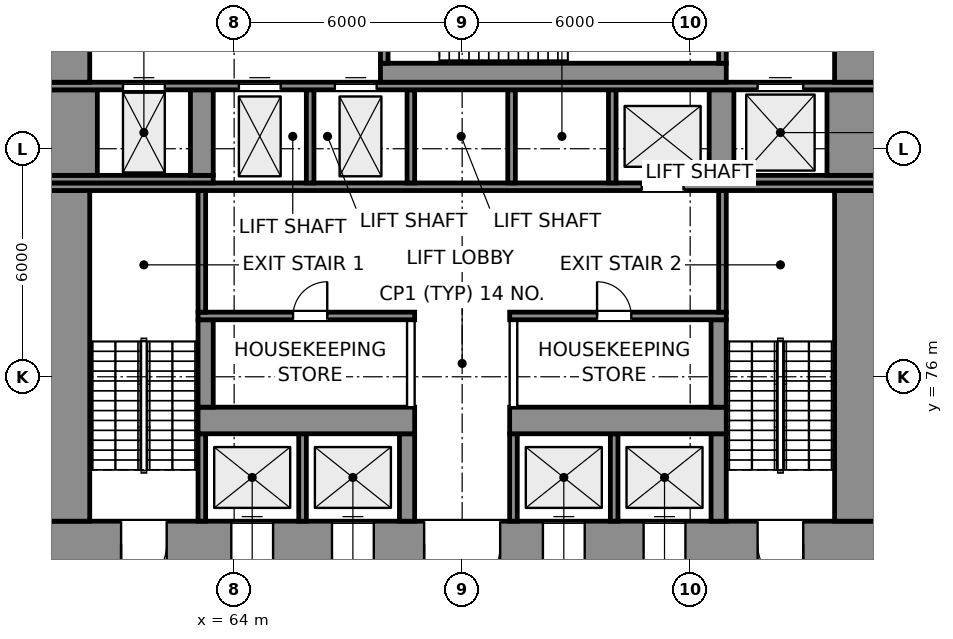
"""IFC4 building model, lengths in metres.
Left out: names, types, materials, properties, quantities, classifications, styles, units other than length and angle.
Written with IfcOpenShell. Run it as: python <this file> out.ifc"""

import sys

from ifc_helpers import new_model, si_unit, direction, frame, frame_2d, origin, place, context, subcontext, project, spatial, rectangle, extrude, element, fill, save


model = new_model("IFC4")
c1 = context("Model", 3, precision=1e-05, world=origin(), true_north=direction((0.0, 1.0)))
c2 = subcontext(c1, "Body", "Model", "MODEL_VIEW")
j1 = project(units=[si_unit("LENGTHUNIT", "METRE"), si_unit("PLANEANGLEUNIT", "RADIAN")], contexts=[c1])
p1 = place(None, origin())
s1 = spatial("IfcSite", under=j1, at=p1, CompositionType="ELEMENT")
p2 = place(p1, origin())
s2 = spatial("IfcBuilding", under=s1, at=p2, CompositionType="ELEMENT")
p3 = place(p2, frame((0.0, 0.0, 29.0)))
s3 = spatial("IfcBuildingStorey", under=s2, at=p3, CompositionType="ELEMENT", Elevation=29.0)
p4 = place(p3, frame((59.0, 71.6, 0.0), z_axis=(0.0, 0.0, 1.0), x_axis=(1.0, 0.0, 0.0)))
e1 = element("IfcWall", 1, at=p4, inside=s3, PredefinedType="SHEAR", context=c2, shape_type="SweptSolid", body=[
    extrude(rectangle(XDim=22.0, YDim=1.2, at=frame_2d((11.0, 0.0))), origin(), (0.0, 0.0, 1.0), 5.0),
])
p5 = place(p4, frame((2.025, 0.0, 0.0)))
e2 = element("IfcOpeningElement", 2, at=p5, cuts=e1, PredefinedType="OPENING", context=c2, shape_type="SweptSolid", body=[
    extrude(rectangle(XDim=1.2, YDim=2.1, at=frame_2d((0.6, 1.05))), frame((0.0, 0.61, 0.0), z_axis=(0.0, -1.0, 0.0), x_axis=(1.0, 0.0, 0.0)), (0.0, 0.0, 1.0), 1.22),
])
p6 = place(p4, frame((18.775, 0.0, 0.0)))
e3 = element("IfcOpeningElement", 3, at=p6, cuts=e1, PredefinedType="OPENING", context=c2, shape_type="SweptSolid", body=[
    extrude(rectangle(XDim=1.2, YDim=2.1, at=frame_2d((0.6, 1.05))), frame((0.0, 0.61, 0.0), z_axis=(0.0, -1.0, 0.0), x_axis=(1.0, 0.0, 0.0)), (0.0, 0.0, 1.0), 1.22),
])
p7 = place(p4, frame((10.0, 0.0, 0.0)))
e4 = element("IfcOpeningElement", 4, at=p7, cuts=e1, PredefinedType="OPENING", context=c2, shape_type="SweptSolid", body=[
    extrude(rectangle(XDim=2.0, YDim=2.1, at=frame_2d((1.0, 1.05))), frame((0.0, 0.61, 0.0), z_axis=(0.0, -1.0, 0.0), x_axis=(1.0, 0.0, 0.0)), (0.0, 0.0, 1.0), 1.22),
])
p8 = place(p4, frame((4.925, 0.0, 0.0)))
e5 = element("IfcOpeningElement", 5, at=p8, cuts=e1, PredefinedType="OPENING", context=c2, shape_type="SweptSolid", body=[
    extrude(rectangle(XDim=1.1, YDim=2.1, at=frame_2d((0.55, 1.05))), frame((0.0, 0.61, 0.0), z_axis=(0.0, -1.0, 0.0), x_axis=(1.0, 0.0, 0.0)), (0.0, 0.0, 1.0), 1.22),
])
p9 = place(p4, frame((7.575, 0.0, 0.0)))
e6 = element("IfcOpeningElement", 6, at=p9, cuts=e1, PredefinedType="OPENING", context=c2, shape_type="SweptSolid", body=[
    extrude(rectangle(XDim=1.1, YDim=2.1, at=frame_2d((0.55, 1.05))), frame((0.0, 0.61, 0.0), z_axis=(0.0, -1.0, 0.0), x_axis=(1.0, 0.0, 0.0)), (0.0, 0.0, 1.0), 1.22),
])
p10 = place(p4, frame((13.125, 0.0, 0.0)))
e7 = element("IfcOpeningElement", 7, at=p10, cuts=e1, PredefinedType="OPENING", context=c2, shape_type="SweptSolid", body=[
    extrude(rectangle(XDim=1.1, YDim=2.1, at=frame_2d((0.55, 1.05))), frame((0.0, 0.61, 0.0), z_axis=(0.0, -1.0, 0.0), x_axis=(1.0, 0.0, 0.0)), (0.0, 0.0, 1.0), 1.22),
])
p11 = place(p4, frame((15.775, 0.0, 0.0)))
e8 = element("IfcOpeningElement", 8, at=p11, cuts=e1, PredefinedType="OPENING", context=c2, shape_type="SweptSolid", body=[
    extrude(rectangle(XDim=1.1, YDim=2.1, at=frame_2d((0.55, 1.05))), frame((0.0, 0.61, 0.0), z_axis=(0.0, -1.0, 0.0), x_axis=(1.0, 0.0, 0.0)), (0.0, 0.0, 1.0), 1.22),
])
p12 = place(p3, frame((59.6, 72.2, 0.0), z_axis=(0.0, 0.0, 1.0), x_axis=(0.0, 1.0, 0.0)))
e9 = element("IfcWall", 9, at=p12, inside=s3, PredefinedType="SHEAR", context=c2, shape_type="SweptSolid", body=[
    extrude(rectangle(XDim=8.7, YDim=1.2, at=frame_2d((4.35, 0.0))), origin(), (0.0, 0.0, 1.0), 5.0),
])
for number, where, z_axis, x_axis in (
    (10, (63.15, 72.2, 0.0), (0.0, 0.0, 1.0), (0.0, 1.0, 0.0)),
    (11, (65.8, 72.2, 0.0), (0.0, 0.0, 1.0), (0.0, 1.0, 0.0)),
):
    element("IfcWall", number, at=place(p3, frame(where, z_axis=z_axis, x_axis=x_axis)), inside=s3, PredefinedType="SHEAR", context=c2, shape_type="SweptSolid", body=[
        extrude(rectangle(XDim=2.3, YDim=0.2, at=frame_2d((1.15, 0.0))), origin(), (0.0, 0.0, 1.0), 5.0),
    ])
p13 = place(p3, frame((68.55, 72.2, 0.0), z_axis=(0.0, 0.0, 1.0), x_axis=(0.0, 1.0, 0.0)))
e12 = element("IfcWall", 12, at=p13, inside=s3, PredefinedType="SHEAR", context=c2, shape_type="SweptSolid", body=[
    extrude(rectangle(XDim=2.3, YDim=0.4, at=frame_2d((1.15, 0.0))), origin(), (0.0, 0.0, 1.0), 5.0),
])
for number, where, z_axis, x_axis in (
    (13, (71.35, 72.2, 0.0), (0.0, 0.0, 1.0), (0.0, 1.0, 0.0)),
    (14, (74.0, 72.2, 0.0), (0.0, 0.0, 1.0), (0.0, 1.0, 0.0)),
):
    element("IfcWall", number, at=place(p3, frame(where, z_axis=z_axis, x_axis=x_axis)), inside=s3, PredefinedType="SHEAR", context=c2, shape_type="SweptSolid", body=[
        extrude(rectangle(XDim=2.3, YDim=0.2, at=frame_2d((1.15, 0.0))), origin(), (0.0, 0.0, 1.0), 5.0),
    ])
p14 = place(p3, frame((76.75, 72.2, 0.0), z_axis=(0.0, 0.0, 1.0), x_axis=(0.0, 1.0, 0.0)))
e15 = element("IfcWall", 15, at=p14, inside=s3, PredefinedType="SHEAR", context=c2, shape_type="SweptSolid", body=[
    extrude(rectangle(XDim=2.3, YDim=0.4, at=frame_2d((1.15, 0.0))), origin(), (0.0, 0.0, 1.0), 5.0),
])
p15 = place(p3, frame((80.4, 72.2, 0.0), z_axis=(0.0, 0.0, 1.0), x_axis=(0.0, 1.0, 0.0)))
e16 = element("IfcWall", 16, at=p15, inside=s3, PredefinedType="SHEAR", context=c2, shape_type="SweptSolid", body=[
    extrude(rectangle(XDim=8.7, YDim=1.2, at=frame_2d((4.35, 0.0))), origin(), (0.0, 0.0, 1.0), 5.0),
])
for number, where, z_axis, x_axis in (
    (17, (63.05, 74.85, 0.0), (0.0, 0.0, 1.0), (1.0, 0.0, 0.0)),
    (18, (71.25, 74.85, 0.0), (0.0, 0.0, 1.0), (1.0, 0.0, 0.0)),
):
    element("IfcWall", number, at=place(p3, frame(where, z_axis=z_axis, x_axis=x_axis)), inside=s3, PredefinedType="SHEAR", context=c2, shape_type="SweptSolid", body=[
        extrude(rectangle(XDim=5.7, YDim=0.7, at=frame_2d((2.85, 0.0))), origin(), (0.0, 0.0, 1.0), 5.0),
    ])
p16 = place(p3, frame((63.25, 75.2, 0.0), z_axis=(0.0, 0.0, 1.0), x_axis=(0.0, 1.0, 0.0)))
e19 = element("IfcWall", 19, at=p16, inside=s3, PredefinedType="SHEAR", context=c2, shape_type="SweptSolid", body=[
    extrude(rectangle(XDim=2.3, YDim=0.4, at=frame_2d((1.15, 0.0))), origin(), (0.0, 0.0, 1.0), 5.0),
])
for number, where, z_axis, x_axis in (
    (20, (68.65, 75.2, 0.0), (0.0, 0.0, 1.0), (0.0, 1.0, 0.0)),
    (21, (71.35, 75.2, 0.0), (0.0, 0.0, 1.0), (0.0, 1.0, 0.0)),
):
    element("IfcWall", number, at=place(p3, frame(where, z_axis=z_axis, x_axis=x_axis)), inside=s3, PredefinedType="PARTITIONING", context=c2, shape_type="SweptSolid", body=[
        extrude(rectangle(XDim=2.3, YDim=0.2, at=frame_2d((1.15, 0.0))), origin(), (0.0, 0.0, 1.0), 4.65),
    ])
p17 = place(p3, frame((76.75, 75.2, 0.0), z_axis=(0.0, 0.0, 1.0), x_axis=(0.0, 1.0, 0.0)))
e22 = element("IfcWall", 22, at=p17, inside=s3, PredefinedType="SHEAR", context=c2, shape_type="SweptSolid", body=[
    extrude(rectangle(XDim=2.3, YDim=0.4, at=frame_2d((1.15, 0.0))), origin(), (0.0, 0.0, 1.0), 5.0),
])
p18 = place(p3, frame((63.05, 77.6, 0.0), z_axis=(0.0, 0.0, 1.0), x_axis=(1.0, 0.0, 0.0)))
e23 = element("IfcWall", 23, at=p18, inside=s3, PredefinedType="SHEAR", context=c2, shape_type="SweptSolid", body=[
    extrude(rectangle(XDim=5.7, YDim=0.2, at=frame_2d((2.85, 0.0))), origin(), (0.0, 0.0, 1.0), 5.0),
])
p19 = place(p18, frame((2.5, 0.0, 0.0)))
e24 = element("IfcOpeningElement", 24, at=p19, cuts=e23, PredefinedType="OPENING", context=c2, shape_type="SweptSolid", body=[
    extrude(rectangle(XDim=0.9, YDim=2.1, at=frame_2d((0.45, 1.05))), frame((0.0, 0.11, 0.0), z_axis=(0.0, -1.0, 0.0), x_axis=(1.0, 0.0, 0.0)), (0.0, 0.0, 1.0), 0.22),
])
p20 = place(p3, frame((71.25, 77.6, 0.0), z_axis=(0.0, 0.0, 1.0), x_axis=(1.0, 0.0, 0.0)))
e25 = element("IfcWall", 25, at=p20, inside=s3, PredefinedType="SHEAR", context=c2, shape_type="SweptSolid", body=[
    extrude(rectangle(XDim=5.7, YDim=0.2, at=frame_2d((2.85, 0.0))), origin(), (0.0, 0.0, 1.0), 5.0),
])
p21 = place(p20, frame((2.3, 0.0, 0.0)))
e26 = element("IfcOpeningElement", 26, at=p21, cuts=e25, PredefinedType="OPENING", context=c2, shape_type="SweptSolid", body=[
    extrude(rectangle(XDim=0.9, YDim=2.1, at=frame_2d((0.45, 1.05))), frame((0.0, 0.11, 0.0), z_axis=(0.0, -1.0, 0.0), x_axis=(1.0, 0.0, 0.0)), (0.0, 0.0, 1.0), 0.22),
])
for number, where, z_axis, x_axis in (
    (27, (63.15, 77.7, 0.0), (0.0, 0.0, 1.0), (0.0, 1.0, 0.0)),
    (28, (76.85, 77.7, 0.0), (0.0, 0.0, 1.0), (0.0, 1.0, 0.0)),
):
    element("IfcWall", number, at=place(p3, frame(where, z_axis=z_axis, x_axis=x_axis)), inside=s3, PredefinedType="SHEAR", context=c2, shape_type="SweptSolid", body=[
        extrude(rectangle(XDim=3.2, YDim=0.2, at=frame_2d((1.6, 0.0))), origin(), (0.0, 0.0, 1.0), 5.0),
    ])
p22 = place(p3, frame((59.0, 81.0, 0.0), z_axis=(0.0, 0.0, 1.0), x_axis=(1.0, 0.0, 0.0)))
e29 = element("IfcWall", 29, at=p22, inside=s3, PredefinedType="SHEAR", context=c2, shape_type="SweptSolid", body=[
    extrude(rectangle(XDim=22.0, YDim=0.2, at=frame_2d((11.0, 0.0))), origin(), (0.0, 0.0, 1.0), 5.0),
])
p23 = place(p22, frame((15.725, 0.0, 0.0)))
e30 = element("IfcOpeningElement", 30, at=p23, cuts=e29, PredefinedType="OPENING", context=c2, shape_type="SweptSolid", body=[
    extrude(rectangle(XDim=1.1, YDim=2.1, at=frame_2d((0.55, 1.05))), frame((0.0, 0.11, 0.0), z_axis=(0.0, -1.0, 0.0), x_axis=(1.0, 0.0, 0.0)), (0.0, 0.0, 1.0), 0.22),
])
p24 = place(p3, frame((59.0, 81.2, 0.0), z_axis=(0.0, 0.0, 1.0), x_axis=(1.0, 0.0, 0.0)))
e31 = element("IfcWall", 31, at=p24, inside=s3, PredefinedType="SHEAR", context=c2, shape_type="SweptSolid", body=[
    extrude(rectangle(XDim=4.45, YDim=0.2, at=frame_2d((2.225, 0.0))), origin(), (0.0, 0.0, 1.0), 5.0),
])
for number, where, z_axis, x_axis in (
    (32, (66.0, 81.1, 0.0), (0.0, 0.0, 1.0), (0.0, 1.0, 0.0)),
    (33, (68.65, 81.1, 0.0), (0.0, 0.0, 1.0), (0.0, 1.0, 0.0)),
    (34, (71.3, 81.1, 0.0), (0.0, 0.0, 1.0), (0.0, 1.0, 0.0)),
    (35, (73.95, 81.1, 0.0), (0.0, 0.0, 1.0), (0.0, 1.0, 0.0)),
):
    element("IfcWall", number, at=place(p3, frame(where, z_axis=z_axis, x_axis=x_axis)), inside=s3, PredefinedType="SHEAR", context=c2, shape_type="SweptSolid", body=[
        extrude(rectangle(XDim=2.45, YDim=0.2, at=frame_2d((1.225, 0.0))), origin(), (0.0, 0.0, 1.0), 5.0),
    ])
p25 = place(p3, frame((76.5, 81.2, 0.0), z_axis=(0.0, 0.0, 1.0), x_axis=(1.0, 0.0, 0.0)))
e36 = element("IfcWall", 36, at=p25, inside=s3, PredefinedType="SHEAR", context=c2, shape_type="SweptSolid", body=[
    extrude(rectangle(XDim=4.5, YDim=0.2, at=frame_2d((2.25, 0.0))), origin(), (0.0, 0.0, 1.0), 5.0),
])
p26 = place(p3, frame((59.7, 81.3, 0.0), z_axis=(0.0, 0.0, 1.0), x_axis=(0.0, 1.0, 0.0)))
e37 = element("IfcWall", 37, at=p26, inside=s3, PredefinedType="SHEAR", context=c2, shape_type="SweptSolid", body=[
    extrude(rectangle(XDim=2.25, YDim=1.4, at=frame_2d((1.125, 0.0))), origin(), (0.0, 0.0, 1.0), 5.0),
])
p27 = place(p3, frame((63.15, 81.3, 0.0), z_axis=(0.0, 0.0, 1.0), x_axis=(0.0, 1.0, 0.0)))
e38 = element("IfcWall", 38, at=p27, inside=s3, PredefinedType="SHEAR", context=c2, shape_type="SweptSolid", body=[
    extrude(rectangle(XDim=2.25, YDim=0.6, at=frame_2d((1.125, 0.0))), origin(), (0.0, 0.0, 1.0), 5.0),
])
p28 = place(p3, frame((76.825, 81.3, 0.0), z_axis=(0.0, 0.0, 1.0), x_axis=(0.0, 1.0, 0.0)))
e39 = element("IfcWall", 39, at=p28, inside=s3, PredefinedType="SHEAR", context=c2, shape_type="SweptSolid", body=[
    extrude(rectangle(XDim=2.25, YDim=0.65, at=frame_2d((1.125, 0.0))), origin(), (0.0, 0.0, 1.0), 5.0),
])
p29 = place(p3, frame((80.3, 81.3, 0.0), z_axis=(0.0, 0.0, 1.0), x_axis=(0.0, 1.0, 0.0)))
e40 = element("IfcWall", 40, at=p29, inside=s3, PredefinedType="SHEAR", context=c2, shape_type="SweptSolid", body=[
    extrude(rectangle(XDim=2.25, YDim=1.4, at=frame_2d((1.125, 0.0))), origin(), (0.0, 0.0, 1.0), 5.0),
])
p30 = place(p3, frame((59.0, 83.65, 0.0), z_axis=(0.0, 0.0, 1.0), x_axis=(1.0, 0.0, 0.0)))
e41 = element("IfcWall", 41, at=p30, inside=s3, PredefinedType="SHEAR", context=c2, shape_type="SweptSolid", body=[
    extrude(rectangle(XDim=22.0, YDim=0.2, at=frame_2d((11.0, 0.0))), origin(), (0.0, 0.0, 1.0), 5.0),
])
p31 = place(p30, frame((5.125, 0.0, 0.0)))
e42 = element("IfcOpeningElement", 42, at=p31, cuts=e41, PredefinedType="OPENING", context=c2, shape_type="SweptSolid", body=[
    extrude(rectangle(XDim=1.1, YDim=2.1, at=frame_2d((0.55, 1.05))), frame((0.0, 0.11, 0.0), z_axis=(0.0, -1.0, 0.0), x_axis=(1.0, 0.0, 0.0)), (0.0, 0.0, 1.0), 0.22),
])
p32 = place(p30, frame((7.65, 0.0, 0.0)))
e43 = element("IfcOpeningElement", 43, at=p32, cuts=e41, PredefinedType="OPENING", context=c2, shape_type="SweptSolid", body=[
    extrude(rectangle(XDim=1.1, YDim=2.1, at=frame_2d((0.55, 1.05))), frame((0.0, 0.11, 0.0), z_axis=(0.0, -1.0, 0.0), x_axis=(1.0, 0.0, 0.0)), (0.0, 0.0, 1.0), 0.22),
])
p33 = place(p30, frame((18.775, 0.0, 0.0)))
e44 = element("IfcOpeningElement", 44, at=p33, cuts=e41, PredefinedType="OPENING", context=c2, shape_type="SweptSolid", body=[
    extrude(rectangle(XDim=1.2, YDim=2.1, at=frame_2d((0.6, 1.05))), frame((0.0, 0.11, 0.0), z_axis=(0.0, -1.0, 0.0), x_axis=(1.0, 0.0, 0.0)), (0.0, 0.0, 1.0), 0.22),
])
p34 = place(p30, frame((2.075, 0.0, 0.0)))
e45 = element("IfcOpeningElement", 45, at=p34, cuts=e41, PredefinedType="OPENING", context=c2, shape_type="SweptSolid", body=[
    extrude(rectangle(XDim=1.1, YDim=2.1, at=frame_2d((0.55, 1.05))), frame((0.0, 0.11, 0.0), z_axis=(0.0, -1.0, 0.0), x_axis=(1.0, 0.0, 0.0)), (0.0, 0.0, 1.0), 0.22),
])
p35 = place(p3, frame((59.6, 83.75, 0.0), z_axis=(0.0, 0.0, 1.0), x_axis=(0.0, 1.0, 0.0)))
e46 = element("IfcWall", 46, at=p35, inside=s3, PredefinedType="SHEAR", context=c2, shape_type="SweptSolid", body=[
    extrude(rectangle(XDim=3.05, YDim=1.2, at=frame_2d((1.525, 0.0))), origin(), (0.0, 0.0, 1.0), 5.0),
])
p36 = place(p35, frame((0.975, 0.0, 0.0)))
e47 = element("IfcOpeningElement", 47, at=p36, cuts=e46, PredefinedType="OPENING", context=c2, shape_type="SweptSolid", body=[
    extrude(rectangle(XDim=1.1, YDim=2.1, at=frame_2d((0.55, 1.05))), frame((0.0, 0.61, 0.0), z_axis=(0.0, -1.0, 0.0), x_axis=(1.0, 0.0, 0.0)), (0.0, 0.0, 1.0), 1.22),
])
p37 = place(p3, frame((67.85, 84.0, 0.0), z_axis=(0.0, 0.0, 1.0), x_axis=(1.0, 0.0, 0.0)))
e48 = element("IfcWall", 48, at=p37, inside=s3, PredefinedType="SHEAR", context=c2, shape_type="SweptSolid", body=[
    extrude(rectangle(XDim=9.1, YDim=0.5, at=frame_2d((4.55, 0.0))), origin(), (0.0, 0.0, 1.0), 5.0),
])
p38 = place(p3, frame((80.4, 83.75, 0.0), z_axis=(0.0, 0.0, 1.0), x_axis=(0.0, 1.0, 0.0)))
e49 = element("IfcWall", 49, at=p38, inside=s3, PredefinedType="SHEAR", context=c2, shape_type="SweptSolid", body=[
    extrude(rectangle(XDim=3.05, YDim=1.2, at=frame_2d((1.525, 0.0))), origin(), (0.0, 0.0, 1.0), 5.0),
])
p39 = place(p38, frame((0.925, 0.0, 0.0)))
e50 = element("IfcOpeningElement", 50, at=p39, cuts=e49, PredefinedType="OPENING", context=c2, shape_type="SweptSolid", body=[
    extrude(rectangle(XDim=1.2, YDim=2.1, at=frame_2d((0.6, 1.05))), frame((0.0, 0.61, 0.0), z_axis=(0.0, -1.0, 0.0), x_axis=(1.0, 0.0, 0.0)), (0.0, 0.0, 1.0), 1.22),
])
p40 = place(p3, frame((67.95, 84.25, 0.0), z_axis=(0.0, 0.0, 1.0), x_axis=(0.0, 1.0, 0.0)))
e51 = element("IfcWall", 51, at=p40, inside=s3, PredefinedType="SHEAR", context=c2, shape_type="SweptSolid", body=[
    extrude(rectangle(XDim=2.55, YDim=0.2, at=frame_2d((1.275, 0.0))), origin(), (0.0, 0.0, 1.0), 5.0),
])
p41 = place(p40, frame((0.825, 0.0, 0.0)))
e52 = element("IfcOpeningElement", 52, at=p41, cuts=e51, PredefinedType="OPENING", context=c2, shape_type="SweptSolid", body=[
    extrude(rectangle(XDim=1.2, YDim=2.1, at=frame_2d((0.6, 1.05))), frame((0.0, 0.11, 0.0), z_axis=(0.0, -1.0, 0.0), x_axis=(1.0, 0.0, 0.0)), (0.0, 0.0, 1.0), 0.22),
])
p42 = place(p3, frame((76.85, 84.25, 0.0), z_axis=(0.0, 0.0, 1.0), x_axis=(0.0, 1.0, 0.0)))
e53 = element("IfcWall", 53, at=p42, inside=s3, PredefinedType="SHEAR", context=c2, shape_type="SweptSolid", body=[
    extrude(rectangle(XDim=2.55, YDim=0.2, at=frame_2d((1.275, 0.0))), origin(), (0.0, 0.0, 1.0), 5.0),
])
p43 = place(p5, frame((1.2, 0.0, 0.0), z_axis=(0.0, 0.0, 1.0), x_axis=(-1.0, 0.0, 0.0)))
e54 = element("IfcDoor", 54, at=p43, inside=s3, OperationType="SINGLE_SWING_RIGHT", PredefinedType="DOOR", context=c2, shape_type="SweptSolid", body=[
    extrude(rectangle(XDim=1.2, YDim=2.1, at=frame_2d((0.6, 1.05))), frame((0.0, 0.025, 0.0), z_axis=(0.0, -1.0, 0.0), x_axis=(1.0, 0.0, 0.0)), (0.0, 0.0, 1.0), 0.05),
])
fill(e2, e54)
p44 = place(p6, frame((1.2, 0.0, 0.0), z_axis=(0.0, 0.0, 1.0), x_axis=(-1.0, 0.0, 0.0)))
e55 = element("IfcDoor", 55, at=p44, inside=s3, OperationType="SINGLE_SWING_LEFT", PredefinedType="DOOR", context=c2, shape_type="SweptSolid", body=[
    extrude(rectangle(XDim=1.2, YDim=2.1, at=frame_2d((0.6, 1.05))), frame((0.0, 0.025, 0.0), z_axis=(0.0, -1.0, 0.0), x_axis=(1.0, 0.0, 0.0)), (0.0, 0.0, 1.0), 0.05),
])
fill(e3, e55)
p45 = place(p7, frame((2.0, 0.0, 0.0), z_axis=(0.0, 0.0, 1.0), x_axis=(-1.0, 0.0, 0.0)))
e56 = element("IfcDoor", 56, at=p45, inside=s3, OperationType="DOUBLE_DOOR_SINGLE_SWING", PredefinedType="DOOR", context=c2, shape_type="SweptSolid", body=[
    extrude(rectangle(XDim=2.0, YDim=2.1, at=frame_2d((1.0, 1.05))), frame((0.0, 0.025, 0.0), z_axis=(0.0, -1.0, 0.0), x_axis=(1.0, 0.0, 0.0)), (0.0, 0.0, 1.0), 0.05),
])
fill(e4, e56)
p46 = place(p31, origin())
e57 = element("IfcDoor", 57, at=p46, inside=s3, OperationType="DOUBLE_DOOR_SLIDING", PredefinedType="DOOR", context=c2, shape_type="SweptSolid", body=[
    extrude(rectangle(XDim=1.1, YDim=2.1, at=frame_2d((0.55, 1.05))), frame((0.0, 0.025, 0.0), z_axis=(0.0, -1.0, 0.0), x_axis=(1.0, 0.0, 0.0)), (0.0, 0.0, 1.0), 0.05),
])
fill(e42, e57)
p47 = place(p32, origin())
e58 = element("IfcDoor", 58, at=p47, inside=s3, OperationType="DOUBLE_DOOR_SLIDING", PredefinedType="DOOR", context=c2, shape_type="SweptSolid", body=[
    extrude(rectangle(XDim=1.1, YDim=2.1, at=frame_2d((0.55, 1.05))), frame((0.0, 0.025, 0.0), z_axis=(0.0, -1.0, 0.0), x_axis=(1.0, 0.0, 0.0)), (0.0, 0.0, 1.0), 0.05),
])
fill(e43, e58)
p48 = place(p23, origin())
e59 = element("IfcDoor", 59, at=p48, inside=s3, OperationType="DOUBLE_DOOR_SLIDING", PredefinedType="DOOR", context=c2, shape_type="SweptSolid", body=[
    extrude(rectangle(XDim=1.1, YDim=2.1, at=frame_2d((0.55, 1.05))), frame((0.0, 0.025, 0.0), z_axis=(0.0, -1.0, 0.0), x_axis=(1.0, 0.0, 0.0)), (0.0, 0.0, 1.0), 0.05),
])
fill(e30, e59)
p49 = place(p8, origin())
e60 = element("IfcDoor", 60, at=p49, inside=s3, OperationType="DOUBLE_DOOR_SLIDING", PredefinedType="DOOR", context=c2, shape_type="SweptSolid", body=[
    extrude(rectangle(XDim=1.1, YDim=2.1, at=frame_2d((0.55, 1.05))), frame((0.0, 0.025, 0.0), z_axis=(0.0, -1.0, 0.0), x_axis=(1.0, 0.0, 0.0)), (0.0, 0.0, 1.0), 0.05),
])
fill(e5, e60)
p50 = place(p9, origin())
e61 = element("IfcDoor", 61, at=p50, inside=s3, OperationType="DOUBLE_DOOR_SLIDING", PredefinedType="DOOR", context=c2, shape_type="SweptSolid", body=[
    extrude(rectangle(XDim=1.1, YDim=2.1, at=frame_2d((0.55, 1.05))), frame((0.0, 0.025, 0.0), z_axis=(0.0, -1.0, 0.0), x_axis=(1.0, 0.0, 0.0)), (0.0, 0.0, 1.0), 0.05),
])
fill(e6, e61)
p51 = place(p10, origin())
e62 = element("IfcDoor", 62, at=p51, inside=s3, OperationType="DOUBLE_DOOR_SLIDING", PredefinedType="DOOR", context=c2, shape_type="SweptSolid", body=[
    extrude(rectangle(XDim=1.1, YDim=2.1, at=frame_2d((0.55, 1.05))), frame((0.0, 0.025, 0.0), z_axis=(0.0, -1.0, 0.0), x_axis=(1.0, 0.0, 0.0)), (0.0, 0.0, 1.0), 0.05),
])
fill(e7, e62)
p52 = place(p11, origin())
e63 = element("IfcDoor", 63, at=p52, inside=s3, OperationType="DOUBLE_DOOR_SLIDING", PredefinedType="DOOR", context=c2, shape_type="SweptSolid", body=[
    extrude(rectangle(XDim=1.1, YDim=2.1, at=frame_2d((0.55, 1.05))), frame((0.0, 0.025, 0.0), z_axis=(0.0, -1.0, 0.0), x_axis=(1.0, 0.0, 0.0)), (0.0, 0.0, 1.0), 0.05),
])
fill(e8, e63)
p53 = place(p33, origin())
e64 = element("IfcDoor", 64, at=p53, inside=s3, OperationType="DOUBLE_DOOR_SLIDING", PredefinedType="DOOR", context=c2, shape_type="SweptSolid", body=[
    extrude(rectangle(XDim=1.2, YDim=2.1, at=frame_2d((0.6, 1.05))), frame((0.0, 0.025, 0.0), z_axis=(0.0, -1.0, 0.0), x_axis=(1.0, 0.0, 0.0)), (0.0, 0.0, 1.0), 0.05),
])
fill(e44, e64)
p54 = place(p34, origin())
e65 = element("IfcDoor", 65, at=p54, inside=s3, OperationType="DOUBLE_DOOR_SLIDING", PredefinedType="DOOR", context=c2, shape_type="SweptSolid", body=[
    extrude(rectangle(XDim=1.1, YDim=2.1, at=frame_2d((0.55, 1.05))), frame((0.0, 0.025, 0.0), z_axis=(0.0, -1.0, 0.0), x_axis=(1.0, 0.0, 0.0)), (0.0, 0.0, 1.0), 0.05),
])
fill(e45, e65)
p55 = place(p19, origin())
e66 = element("IfcDoor", 66, at=p55, inside=s3, OperationType="SINGLE_SWING_RIGHT", PredefinedType="DOOR", context=c2, shape_type="SweptSolid", body=[
    extrude(rectangle(XDim=0.9, YDim=2.1, at=frame_2d((0.45, 1.05))), frame((0.0, 0.025, 0.0), z_axis=(0.0, -1.0, 0.0), x_axis=(1.0, 0.0, 0.0)), (0.0, 0.0, 1.0), 0.05),
])
fill(e24, e66)
p56 = place(p21, origin())
e67 = element("IfcDoor", 67, at=p56, inside=s3, OperationType="SINGLE_SWING_LEFT", PredefinedType="DOOR", context=c2, shape_type="SweptSolid", body=[
    extrude(rectangle(XDim=0.9, YDim=2.1, at=frame_2d((0.45, 1.05))), frame((0.0, 0.025, 0.0), z_axis=(0.0, -1.0, 0.0), x_axis=(1.0, 0.0, 0.0)), (0.0, 0.0, 1.0), 0.05),
])
fill(e26, e67)
save(model, sys.argv[1])
